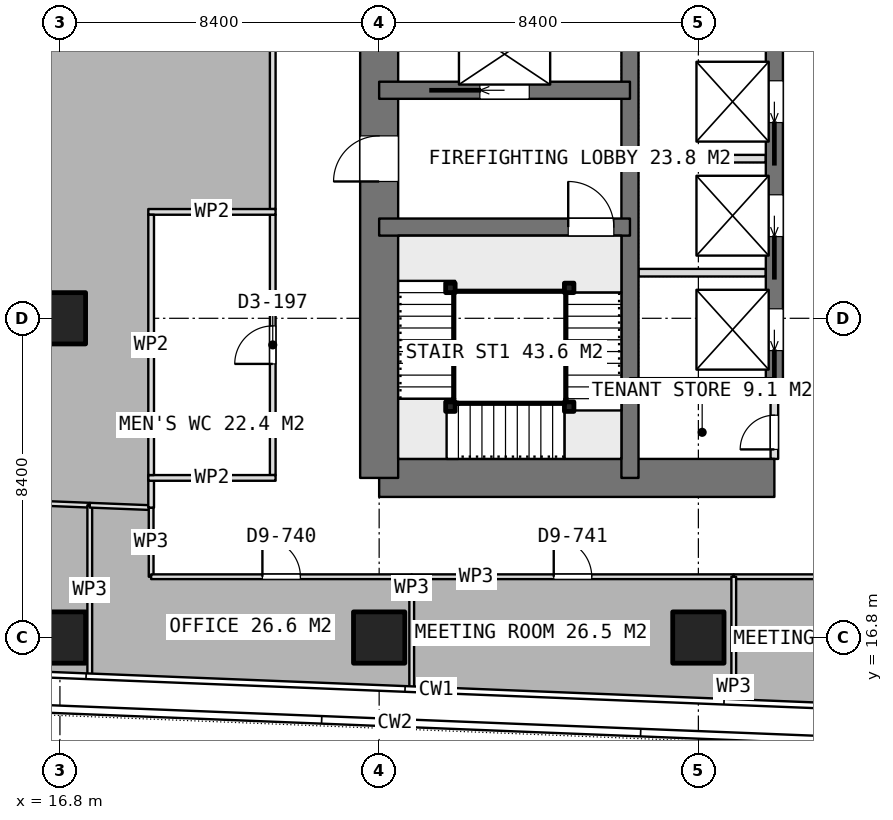
"""IFC4 building model, lengths in metres.
Left out: names, types, materials, properties, quantities, classifications, styles, units other than length and angle.
Written with IfcOpenShell. Run it as: python <this file> out.ifc"""

import sys

from ifc_helpers import new_model, si_unit, direction, frame, frame_2d, origin, origin_2d, place, context, subcontext, project, spatial, rectangle, extrude, element, fill, save


model = new_model("IFC4")
c1 = context("Model", 3, precision=1e-05, world=origin(), true_north=direction((0.0, 1.0)))
c2 = subcontext(c1, "Body", "Model", "MODEL_VIEW")
j1 = project(units=[si_unit("LENGTHUNIT", "METRE"), si_unit("PLANEANGLEUNIT", "RADIAN")], contexts=[c1])
p1 = place(None, origin())
s1 = spatial("IfcSite", under=j1, at=p1, CompositionType="ELEMENT")
p2 = place(p1, origin())
s2 = spatial("IfcBuilding", under=s1, at=p2, CompositionType="ELEMENT")
p3 = place(p2, frame((0.0, 0.0, 187.7)))
s3 = spatial("IfcBuildingStorey", under=s2, at=p3, CompositionType="ELEMENT", Elevation=187.7)
p4 = place(p3, frame((25.2, 21.0, 0.0), z_axis=(0.0, 0.0, 1.0), x_axis=(1.0, 0.0, 0.0)))
e1 = element("IfcWall", 1, at=p4, inside=s3, PredefinedType="SHEAR", context=c2, shape_type="SweptSolid", body=[
    extrude(rectangle(XDim=10.4, YDim=1.0, at=frame_2d((5.2, 0.0))), origin(), (0.0, 0.0, 1.0), 3.75),
])
p5 = place(p3, frame((25.2, 21.0, 0.0), z_axis=(0.0, 0.0, 1.0), x_axis=(0.0, 1.0, 0.0)))
e2 = element("IfcWall", 2, at=p5, inside=s3, PredefinedType="SHEAR", context=c2, shape_type="SweptSolid", body=[
    extrude(rectangle(XDim=25.2, YDim=1.0, at=frame_2d((12.6, 0.0))), origin(), (0.0, 0.0, 1.0), 3.75),
])
p6 = place(p5, frame((7.8, 0.0, 0.0)))
e3 = element("IfcOpeningElement", 3, at=p6, cuts=e2, PredefinedType="OPENING", context=c2, shape_type="SweptSolid", body=[
    extrude(rectangle(XDim=1.2, YDim=2.1, at=frame_2d((0.6, 1.05))), frame((0.0, 0.51, 0.0), z_axis=(0.0, -1.0, 0.0), x_axis=(1.0, 0.0, 0.0)), (0.0, 0.0, 1.0), 1.02),
])
p7 = place(p5, frame((14.25, 0.0, 0.0)))
e4 = element("IfcOpeningElement", 4, at=p7, cuts=e2, PredefinedType="OPENING", context=c2, shape_type="SweptSolid", body=[
    extrude(rectangle(XDim=0.9, YDim=2.1, at=frame_2d((0.45, 1.05))), frame((0.0, 0.51, 0.0), z_axis=(0.0, -1.0, 0.0), x_axis=(1.0, 0.0, 0.0)), (0.0, 0.0, 1.0), 1.02),
])
p8 = place(p5, frame((16.85, 0.0, 0.0)))
e5 = element("IfcOpeningElement", 5, at=p8, cuts=e2, PredefinedType="OPENING", context=c2, shape_type="SweptSolid", body=[
    extrude(rectangle(XDim=0.9, YDim=2.1, at=frame_2d((0.45, 1.05))), frame((0.0, 0.51, 0.0), z_axis=(0.0, -1.0, 0.0), x_axis=(1.0, 0.0, 0.0)), (0.0, 0.0, 1.0), 1.02),
])
p9 = place(p5, frame((19.025, 0.0, 0.0)))
e6 = element("IfcOpeningElement", 6, at=p9, cuts=e2, PredefinedType="OPENING", context=c2, shape_type="SweptSolid", body=[
    extrude(rectangle(XDim=1.2, YDim=2.1, at=frame_2d((0.6, 1.05))), frame((0.0, 0.51, 0.0), z_axis=(0.0, -1.0, 0.0), x_axis=(1.0, 0.0, 0.0)), (0.0, 0.0, 1.0), 1.02),
])
p10 = place(p3, frame((31.8, 21.0, 0.0), z_axis=(0.0, 0.0, 1.0), x_axis=(0.0, 1.0, 0.0)))
e7 = element("IfcWall", 7, at=p10, inside=s3, PredefinedType="SHEAR", context=c2, shape_type="SweptSolid", body=[
    extrude(rectangle(XDim=25.2, YDim=0.45, at=frame_2d((12.6, 0.0))), origin(), (0.0, 0.0, 1.0), 3.75),
])
p11 = place(p3, frame((35.6, 23.4, 0.0), z_axis=(0.0, 0.0, 1.0), x_axis=(0.0, 1.0, 0.0)))
e8 = element("IfcWall", 8, at=p11, inside=s3, PredefinedType="SHEAR", context=c2, shape_type="SweptSolid", body=[
    extrude(rectangle(XDim=18.0, YDim=0.45, at=frame_2d((9.0, 0.0))), origin(), (0.0, 0.0, 1.0), 3.75),
])
p12 = place(p11, frame((0.95, 0.0, 0.0)))
e9 = element("IfcOpeningElement", 9, at=p12, cuts=e8, PredefinedType="OPENING", context=c2, shape_type="SweptSolid", body=[
    extrude(rectangle(XDim=1.1, YDim=2.1, at=frame_2d((0.55, 1.05))), frame((0.0, 0.235, 0.0), z_axis=(0.0, -1.0, 0.0), x_axis=(1.0, 0.0, 0.0)), (0.0, 0.0, 1.0), 0.47),
])
p13 = place(p11, frame((3.95, 0.0, 0.0)))
e10 = element("IfcOpeningElement", 10, at=p13, cuts=e8, PredefinedType="OPENING", context=c2, shape_type="SweptSolid", body=[
    extrude(rectangle(XDim=1.1, YDim=2.1, at=frame_2d((0.55, 1.05))), frame((0.0, 0.235, 0.0), z_axis=(0.0, -1.0, 0.0), x_axis=(1.0, 0.0, 0.0)), (0.0, 0.0, 1.0), 0.47),
])
p14 = place(p11, frame((6.95, 0.0, 0.0)))
e11 = element("IfcOpeningElement", 11, at=p14, cuts=e8, PredefinedType="OPENING", context=c2, shape_type="SweptSolid", body=[
    extrude(rectangle(XDim=1.1, YDim=2.1, at=frame_2d((0.55, 1.05))), frame((0.0, 0.235, 0.0), z_axis=(0.0, -1.0, 0.0), x_axis=(1.0, 0.0, 0.0)), (0.0, 0.0, 1.0), 0.47),
])
p15 = place(p11, frame((9.95, 0.0, 0.0)))
e12 = element("IfcOpeningElement", 12, at=p15, cuts=e8, PredefinedType="OPENING", context=c2, shape_type="SweptSolid", body=[
    extrude(rectangle(XDim=1.1, YDim=2.1, at=frame_2d((0.55, 1.05))), frame((0.0, 0.235, 0.0), z_axis=(0.0, -1.0, 0.0), x_axis=(1.0, 0.0, 0.0)), (0.0, 0.0, 1.0), 0.47),
])
p16 = place(p11, frame((12.95, 0.0, 0.0)))
e13 = element("IfcOpeningElement", 13, at=p16, cuts=e8, PredefinedType="OPENING", context=c2, shape_type="SweptSolid", body=[
    extrude(rectangle(XDim=1.1, YDim=2.1, at=frame_2d((0.55, 1.05))), frame((0.0, 0.235, 0.0), z_axis=(0.0, -1.0, 0.0), x_axis=(1.0, 0.0, 0.0)), (0.0, 0.0, 1.0), 0.47),
])
p17 = place(p11, frame((15.95, 0.0, 0.0)))
e14 = element("IfcOpeningElement", 14, at=p17, cuts=e8, PredefinedType="OPENING", context=c2, shape_type="SweptSolid", body=[
    extrude(rectangle(XDim=1.1, YDim=2.1, at=frame_2d((0.55, 1.05))), frame((0.0, 0.235, 0.0), z_axis=(0.0, -1.0, 0.0), x_axis=(1.0, 0.0, 0.0)), (0.0, 0.0, 1.0), 0.47),
])
p18 = place(p3, frame((31.8, 23.4, 0.0), z_axis=(0.0, 0.0, 1.0), x_axis=(1.0, 0.0, 0.0)))
e15 = element("IfcWall", 15, at=p18, inside=s3, PredefinedType="SHEAR", context=c2, shape_type="SweptSolid", body=[
    extrude(rectangle(XDim=3.8, YDim=0.45, at=frame_2d((1.9, 0.0))), origin(), (0.0, 0.0, 1.0), 3.75),
])
p19 = place(p3, frame((25.2, 27.6, 0.0), z_axis=(0.0, 0.0, 1.0), x_axis=(1.0, 0.0, 0.0)))
e16 = element("IfcWall", 16, at=p19, inside=s3, PredefinedType="SHEAR", context=c2, shape_type="SweptSolid", body=[
    extrude(rectangle(XDim=6.6, YDim=0.45, at=frame_2d((3.3, 0.0))), origin(), (0.0, 0.0, 1.0), 3.75),
])
p20 = place(p19, frame((4.975, 0.0, 0.0)))
e17 = element("IfcOpeningElement", 17, at=p20, cuts=e16, PredefinedType="OPENING", context=c2, shape_type="SweptSolid", body=[
    extrude(rectangle(XDim=1.2, YDim=2.1, at=frame_2d((0.6, 1.05))), frame((0.0, 0.235, 0.0), z_axis=(0.0, -1.0, 0.0), x_axis=(1.0, 0.0, 0.0)), (0.0, 0.0, 1.0), 0.47),
])
p21 = place(p3, frame((25.2, 31.2, 0.0), z_axis=(0.0, 0.0, 1.0), x_axis=(1.0, 0.0, 0.0)))
e18 = element("IfcWall", 18, at=p21, inside=s3, PredefinedType="SHEAR", context=c2, shape_type="SweptSolid", body=[
    extrude(rectangle(XDim=6.6, YDim=0.45, at=frame_2d((3.3, 0.0))), origin(), (0.0, 0.0, 1.0), 3.75),
])
p22 = place(p21, frame((2.65, 0.0, 0.0)))
e19 = element("IfcOpeningElement", 19, at=p22, cuts=e18, PredefinedType="OPENING", context=c2, shape_type="SweptSolid", body=[
    extrude(rectangle(XDim=1.3, YDim=2.1, at=frame_2d((0.65, 1.05))), frame((0.0, 0.235, 0.0), z_axis=(0.0, -1.0, 0.0), x_axis=(1.0, 0.0, 0.0)), (0.0, 0.0, 1.0), 0.47),
])
for number, where, z_axis, x_axis in (
    (20, (16.8, 16.8, 0.0), (0.0, 0.0, 1.0), (1.0, 0.0, 0.0)),
    (21, (16.8, 25.2, 0.0), (0.0, 0.0, 1.0), (1.0, 0.0, 0.0)),
    (22, (25.2, 16.8, 0.0), (0.0, 0.0, 1.0), (1.0, 0.0, 0.0)),
    (23, (33.6, 16.8, 0.0), (0.0, 0.0, 1.0), (1.0, 0.0, 0.0)),
):
    element("IfcColumn", number, at=place(p3, frame(where, z_axis=z_axis, x_axis=x_axis)), inside=s3, PredefinedType="COLUMN", context=c2, shape_type="SweptSolid", body=[
        extrude(rectangle(XDim=1.35, YDim=1.35, at=origin_2d()), origin(), (0.0, 0.0, 1.0), 3.75),
    ])
for number, where, z_axis, x_axis in (
    (24, (32.025, 26.4, 0.0), (0.0, 0.0, 1.0), (1.0, 0.0, 0.0)),
    (25, (32.025, 29.4, 0.0), (0.0, 0.0, 1.0), (1.0, 0.0, 0.0)),
):
    element("IfcWall", number, at=place(p3, frame(where, z_axis=z_axis, x_axis=x_axis)), inside=s3, PredefinedType="PARTITIONING", context=c2, shape_type="SweptSolid", body=[
        extrude(rectangle(XDim=3.35, YDim=0.2, at=frame_2d((1.675, 0.0))), origin(), (0.0, 0.0, 1.0), 3.5),
    ])
p23 = place(p3, frame((35.6, 21.5, 0.0), z_axis=(0.0, 0.0, 1.0), x_axis=(0.0, 1.0, 0.0)))
e26 = element("IfcWall", 26, at=p23, inside=s3, PredefinedType="PARTITIONING", context=c2, shape_type="SweptSolid", body=[
    extrude(rectangle(XDim=1.675, YDim=0.2, at=frame_2d((0.837, 0.0))), origin(), (0.0, 0.0, 1.0), 3.5),
])
p24 = place(p23, frame((0.25, 0.0, 0.0)))
e27 = element("IfcOpeningElement", 27, at=p24, cuts=e26, PredefinedType="OPENING", context=c2, shape_type="SweptSolid", body=[
    extrude(rectangle(XDim=0.9, YDim=2.1, at=frame_2d((0.45, 1.05))), frame((0.0, 0.11, 0.0), z_axis=(0.0, -1.0, 0.0), x_axis=(1.0, 0.0, 0.0)), (0.0, 0.0, 1.0), 0.22),
])
for number, where, z_axis, x_axis in (
    (28, (19.125, 21.0, 0.0), (0.0, 0.0, 1.0), (1.0, 0.0, 0.0)),
    (29, (19.125, 28.0, 0.0), (0.0, 0.0, 1.0), (1.0, 0.0, 0.0)),
):
    element("IfcWall", number, at=place(p3, frame(where, z_axis=z_axis, x_axis=x_axis)), inside=s3, PredefinedType="PARTITIONING", context=c2, shape_type="SweptSolid", body=[
        extrude(rectangle(XDim=3.35, YDim=0.15, at=frame_2d((1.675, 0.0))), origin(), (0.0, 0.0, 1.0), 3.5),
    ])
p25 = place(p3, frame((19.2, 21.075, 0.0), z_axis=(0.0, 0.0, 1.0), x_axis=(0.0, 1.0, 0.0)))
e30 = element("IfcWall", 30, at=p25, inside=s3, PredefinedType="PARTITIONING", context=c2, shape_type="SweptSolid", body=[
    extrude(rectangle(XDim=6.85, YDim=0.15, at=frame_2d((3.425, 0.0))), origin(), (0.0, 0.0, 1.0), 3.5),
])
p26 = place(p3, frame((22.4, 21.075, 0.0), z_axis=(0.0, 0.0, 1.0), x_axis=(0.0, 1.0, 0.0)))
e31 = element("IfcWall", 31, at=p26, inside=s3, PredefinedType="PARTITIONING", context=c2, shape_type="SweptSolid", body=[
    extrude(rectangle(XDim=6.85, YDim=0.15, at=frame_2d((3.425, 0.0))), origin(), (0.0, 0.0, 1.0), 3.5),
])
p27 = place(p26, frame((2.925, 0.0, 0.0)))
e32 = element("IfcOpeningElement", 32, at=p27, cuts=e31, PredefinedType="OPENING", context=c2, shape_type="SweptSolid", body=[
    extrude(rectangle(XDim=1.0, YDim=2.1, at=frame_2d((0.5, 1.05))), frame((0.0, 0.085, 0.0), z_axis=(0.0, -1.0, 0.0), x_axis=(1.0, 0.0, 0.0)), (0.0, 0.0, 1.0), 0.17),
])
p28 = place(p3, frame((34.531, 18.4, 0.0), z_axis=(0.0, 0.0, 1.0), x_axis=(1.0, 0.0, 0.0)))
e33 = element("IfcWall", 33, at=p28, inside=s3, PredefinedType="PARTITIONING", context=c2, shape_type="SweptSolid", body=[
    extrude(rectangle(XDim=8.292, YDim=0.125, at=frame_2d((4.146, 0.0))), origin(), (0.0, 0.0, 1.0), 3.5),
])
p29 = place(p28, frame((3.646, 0.0, 0.0)))
e34 = element("IfcOpeningElement", 34, at=p29, cuts=e33, PredefinedType="OPENING", context=c2, shape_type="SweptSolid", body=[
    extrude(rectangle(XDim=1.0, YDim=2.1, at=frame_2d((0.5, 1.05))), frame((0.0, 0.073, 0.0), z_axis=(0.0, -1.0, 0.0), x_axis=(1.0, 0.0, 0.0)), (0.0, 0.0, 1.0), 0.145),
])
p30 = place(p3, frame((34.531, 15.182, 0.0), z_axis=(0.0, 0.0, 1.0), x_axis=(0.0, 1.0, 0.0)))
e35 = element("IfcWall", 35, at=p30, inside=s3, PredefinedType="PARTITIONING", context=c2, shape_type="SweptSolid", body=[
    extrude(rectangle(XDim=3.218, YDim=0.125, at=frame_2d((1.609, 0.0))), origin(), (0.0, 0.0, 1.0), 3.5),
])
p31 = place(p3, frame((12.005, 20.505, 0.0), z_axis=(0.0, 0.0, 1.0), x_axis=(0.999203122171, -0.039913915407, 0.0)))
e36 = element("IfcWall", 36, at=p31, inside=s3, PredefinedType="PARTITIONING", context=c2, shape_type="SweptSolid", body=[
    extrude(rectangle(XDim=5.584, YDim=0.125, at=frame_2d((2.792, 0.0))), origin(), (0.0, 0.0, 1.0), 3.5),
])
p32 = place(p31, frame((2.292, 0.0, 0.0)))
e37 = element("IfcOpeningElement", 37, at=p32, cuts=e36, PredefinedType="OPENING", context=c2, shape_type="SweptSolid", body=[
    extrude(rectangle(XDim=1.0, YDim=2.1, at=frame_2d((0.5, 1.05))), frame((0.0, 0.073, 0.0), z_axis=(0.0, -1.0, 0.0), x_axis=(1.0, 0.0, 0.0)), (0.0, 0.0, 1.0), 0.145),
])
p33 = place(p3, frame((17.585, 20.282, 0.0), z_axis=(0.0, 0.0, 1.0), x_axis=(0.0, -1.0, 0.0)))
e38 = element("IfcWall", 38, at=p33, inside=s3, PredefinedType="PARTITIONING", context=c2, shape_type="SweptSolid", body=[
    extrude(rectangle(XDim=4.453, YDim=0.125, at=frame_2d((2.227, 0.0))), origin(), (0.0, 0.0, 1.0), 3.5),
])
p34 = place(p3, frame((17.586, 20.282, 0.0), z_axis=(0.0, 0.0, 1.0), x_axis=(0.999215619009, -0.039599832428, 0.0)))
e39 = element("IfcWall", 39, at=p34, inside=s3, PredefinedType="PARTITIONING", context=c2, shape_type="SweptSolid", body=[
    extrude(rectangle(XDim=1.615, YDim=0.125, at=frame_2d((0.808, 0.0))), origin(), (0.0, 0.0, 1.0), 3.5),
])
p35 = place(p3, frame((19.2, 20.218, 0.0), z_axis=(0.0, 0.0, 1.0), x_axis=(0.0, -1.0, 0.0)))
e40 = element("IfcWall", 40, at=p35, inside=s3, PredefinedType="PARTITIONING", context=c2, shape_type="SweptSolid", body=[
    extrude(rectangle(XDim=1.818, YDim=0.125, at=frame_2d((0.909, 0.0))), origin(), (0.0, 0.0, 1.0), 3.5),
])
p36 = place(p3, frame((19.2, 18.4, 0.0), z_axis=(0.0, 0.0, 1.0), x_axis=(1.0, 0.0, 0.0)))
e41 = element("IfcWall", 41, at=p36, inside=s3, PredefinedType="PARTITIONING", context=c2, shape_type="SweptSolid", body=[
    extrude(rectangle(XDim=6.857, YDim=0.125, at=frame_2d((3.428, 0.0))), origin(), (0.0, 0.0, 1.0), 3.5),
])
p37 = place(p36, frame((2.928, 0.0, 0.0)))
e42 = element("IfcOpeningElement", 42, at=p37, cuts=e41, PredefinedType="OPENING", context=c2, shape_type="SweptSolid", body=[
    extrude(rectangle(XDim=1.0, YDim=2.1, at=frame_2d((0.5, 1.05))), frame((0.0, 0.073, 0.0), z_axis=(0.0, -1.0, 0.0), x_axis=(1.0, 0.0, 0.0)), (0.0, 0.0, 1.0), 0.145),
])
p38 = place(p3, frame((26.057, 18.4, 0.0), z_axis=(0.0, 0.0, 1.0), x_axis=(0.0, -1.0, 0.0)))
e43 = element("IfcWall", 43, at=p38, inside=s3, PredefinedType="PARTITIONING", context=c2, shape_type="SweptSolid", body=[
    extrude(rectangle(XDim=2.91, YDim=0.125, at=frame_2d((1.455, 0.0))), origin(), (0.0, 0.0, 1.0), 3.5),
])
p39 = place(p3, frame((26.058, 18.4, 0.0), z_axis=(0.0, 0.0, 1.0), x_axis=(1.0, 0.0, 0.0)))
e44 = element("IfcWall", 44, at=p39, inside=s3, PredefinedType="PARTITIONING", context=c2, shape_type="SweptSolid", body=[
    extrude(rectangle(XDim=8.472, YDim=0.125, at=frame_2d((4.236, 0.0))), origin(), (0.0, 0.0, 1.0), 3.5),
])
p40 = place(p39, frame((3.736, 0.0, 0.0)))
e45 = element("IfcOpeningElement", 45, at=p40, cuts=e44, PredefinedType="OPENING", context=c2, shape_type="SweptSolid", body=[
    extrude(rectangle(XDim=1.0, YDim=2.1, at=frame_2d((0.5, 1.05))), frame((0.0, 0.073, 0.0), z_axis=(0.0, -1.0, 0.0), x_axis=(1.0, 0.0, 0.0)), (0.0, 0.0, 1.0), 0.145),
])
p41 = place(p3, frame((22.4, 52.575, 0.0), z_axis=(0.0, 0.0, 1.0), x_axis=(0.0, -1.0, 0.0)))
e46 = element("IfcWall", 46, at=p41, inside=s3, PredefinedType="PARTITIONING", context=c2, shape_type="SweptSolid", body=[
    extrude(rectangle(XDim=24.5, YDim=0.15, at=frame_2d((12.25, 0.0))), origin(), (0.0, 0.0, 1.0), 3.5),
])
p42 = place(p41, frame((11.788, 0.0, 0.0)))
e47 = element("IfcOpeningElement", 47, at=p42, cuts=e46, PredefinedType="OPENING", context=c2, shape_type="SweptSolid", body=[
    extrude(rectangle(XDim=1.0, YDim=2.1, at=frame_2d((0.5, 1.05))), frame((0.0, 0.085, 0.0), z_axis=(0.0, -1.0, 0.0), x_axis=(1.0, 0.0, 0.0)), (0.0, 0.0, 1.0), 0.17),
])
p43 = place(p3, frame((19.2, 21.075, 0.0), z_axis=(0.0, 0.0, 1.0), x_axis=(0.0, -1.0, 0.0)))
e48 = element("IfcWall", 48, at=p43, inside=s3, PredefinedType="PARTITIONING", context=c2, shape_type="SweptSolid", body=[
    extrude(rectangle(XDim=0.857, YDim=0.15, at=frame_2d((0.428, 0.0))), origin(), (0.0, 0.0, 1.0), 3.5),
])
for number, where, z_axis, x_axis in (
    (49, (30.2, 26.0, 0.0), (0.0, 0.0, 1.0), (1.0, 0.0, 0.0)),
    (50, (30.2, 22.875, 0.0), (0.0, 0.0, 1.0), (1.0, 0.0, 0.0)),
    (51, (27.075, 22.875, 0.0), (0.0, 0.0, 1.0), (1.0, 0.0, 0.0)),
    (52, (27.075, 26.0, 0.0), (0.0, 0.0, 1.0), (1.0, 0.0, 0.0)),
):
    element("IfcColumn", number, at=place(p3, frame(where, z_axis=z_axis, x_axis=x_axis)), inside=s3, PredefinedType="COLUMN", context=c2, shape_type="SweptSolid", body=[
        extrude(rectangle(XDim=0.25, YDim=0.25, at=origin_2d()), origin(), (0.0, 0.0, 1.0), 3.75),
    ])
p44 = place(p6, origin())
e53 = element("IfcDoor", 53, at=p44, inside=s3, OperationType="SINGLE_SWING_LEFT", PredefinedType="DOOR", context=c2, shape_type="SweptSolid", body=[
    extrude(rectangle(XDim=1.2, YDim=2.1, at=frame_2d((0.6, 1.05))), frame((0.0, 0.025, 0.0), z_axis=(0.0, -1.0, 0.0), x_axis=(1.0, 0.0, 0.0)), (0.0, 0.0, 1.0), 0.05),
])
fill(e3, e53)
p45 = place(p24, origin())
e54 = element("IfcDoor", 54, at=p45, inside=s3, OperationType="SINGLE_SWING_LEFT", PredefinedType="DOOR", context=c2, shape_type="SweptSolid", body=[
    extrude(rectangle(XDim=0.9, YDim=2.1, at=frame_2d((0.45, 1.05))), frame((0.0, 0.025, 0.0), z_axis=(0.0, -1.0, 0.0), x_axis=(1.0, 0.0, 0.0)), (0.0, 0.0, 1.0), 0.05),
])
fill(e27, e54)
p46 = place(p12, origin())
e55 = element("IfcDoor", 55, at=p46, inside=s3, OperationType="SLIDING_TO_LEFT", PredefinedType="USERDEFINED", context=c2, shape_type="SweptSolid", body=[
    extrude(rectangle(XDim=1.1, YDim=2.1, at=frame_2d((0.55, 1.05))), frame((0.0, 0.025, 0.0), z_axis=(0.0, -1.0, 0.0), x_axis=(1.0, 0.0, 0.0)), (0.0, 0.0, 1.0), 0.05),
])
fill(e9, e55)
p47 = place(p13, origin())
e56 = element("IfcDoor", 56, at=p47, inside=s3, OperationType="SLIDING_TO_LEFT", PredefinedType="USERDEFINED", context=c2, shape_type="SweptSolid", body=[
    extrude(rectangle(XDim=1.1, YDim=2.1, at=frame_2d((0.55, 1.05))), frame((0.0, 0.025, 0.0), z_axis=(0.0, -1.0, 0.0), x_axis=(1.0, 0.0, 0.0)), (0.0, 0.0, 1.0), 0.05),
])
fill(e10, e56)
p48 = place(p14, origin())
e57 = element("IfcDoor", 57, at=p48, inside=s3, OperationType="SLIDING_TO_LEFT", PredefinedType="USERDEFINED", context=c2, shape_type="SweptSolid", body=[
    extrude(rectangle(XDim=1.1, YDim=2.1, at=frame_2d((0.55, 1.05))), frame((0.0, 0.025, 0.0), z_axis=(0.0, -1.0, 0.0), x_axis=(1.0, 0.0, 0.0)), (0.0, 0.0, 1.0), 0.05),
])
fill(e11, e57)
p49 = place(p22, origin())
e58 = element("IfcDoor", 58, at=p49, inside=s3, OperationType="SLIDING_TO_LEFT", PredefinedType="USERDEFINED", context=c2, shape_type="SweptSolid", body=[
    extrude(rectangle(XDim=1.3, YDim=2.1, at=frame_2d((0.65, 1.05))), frame((0.0, 0.025, 0.0), z_axis=(0.0, -1.0, 0.0), x_axis=(1.0, 0.0, 0.0)), (0.0, 0.0, 1.0), 0.05),
])
fill(e19, e58)
p50 = place(p27, origin())
e59 = element("IfcDoor", 59, at=p50, inside=s3, OperationType="SINGLE_SWING_LEFT", PredefinedType="DOOR", context=c2, shape_type="SweptSolid", body=[
    extrude(rectangle(XDim=1.0, YDim=2.1, at=frame_2d((0.5, 1.05))), frame((0.0, 0.025, 0.0), z_axis=(0.0, -1.0, 0.0), x_axis=(1.0, 0.0, 0.0)), (0.0, 0.0, 1.0), 0.05),
])
fill(e32, e59)
p51 = place(p37, origin())
e60 = element("IfcDoor", 60, at=p51, inside=s3, OperationType="SINGLE_SWING_LEFT", PredefinedType="DOOR", context=c2, shape_type="SweptSolid", body=[
    extrude(rectangle(XDim=1.0, YDim=2.1, at=frame_2d((0.5, 1.05))), frame((0.0, 0.025, 0.0), z_axis=(0.0, -1.0, 0.0), x_axis=(1.0, 0.0, 0.0)), (0.0, 0.0, 1.0), 0.05),
])
fill(e42, e60)
p52 = place(p40, origin())
e61 = element("IfcDoor", 61, at=p52, inside=s3, OperationType="SINGLE_SWING_LEFT", PredefinedType="DOOR", context=c2, shape_type="SweptSolid", body=[
    extrude(rectangle(XDim=1.0, YDim=2.1, at=frame_2d((0.5, 1.05))), frame((0.0, 0.025, 0.0), z_axis=(0.0, -1.0, 0.0), x_axis=(1.0, 0.0, 0.0)), (0.0, 0.0, 1.0), 0.05),
])
fill(e45, e61)
p53 = place(p20, origin())
e62 = element("IfcDoor", 62, at=p53, inside=s3, OperationType="SINGLE_SWING_RIGHT", PredefinedType="DOOR", context=c2, shape_type="SweptSolid", body=[
    extrude(rectangle(XDim=1.2, YDim=2.1, at=frame_2d((0.6, 1.05))), frame((0.0, 0.025, 0.0), z_axis=(0.0, -1.0, 0.0), x_axis=(1.0, 0.0, 0.0)), (0.0, 0.0, 1.0), 0.05),
])
fill(e17, e62)
save(model, sys.argv[1])
